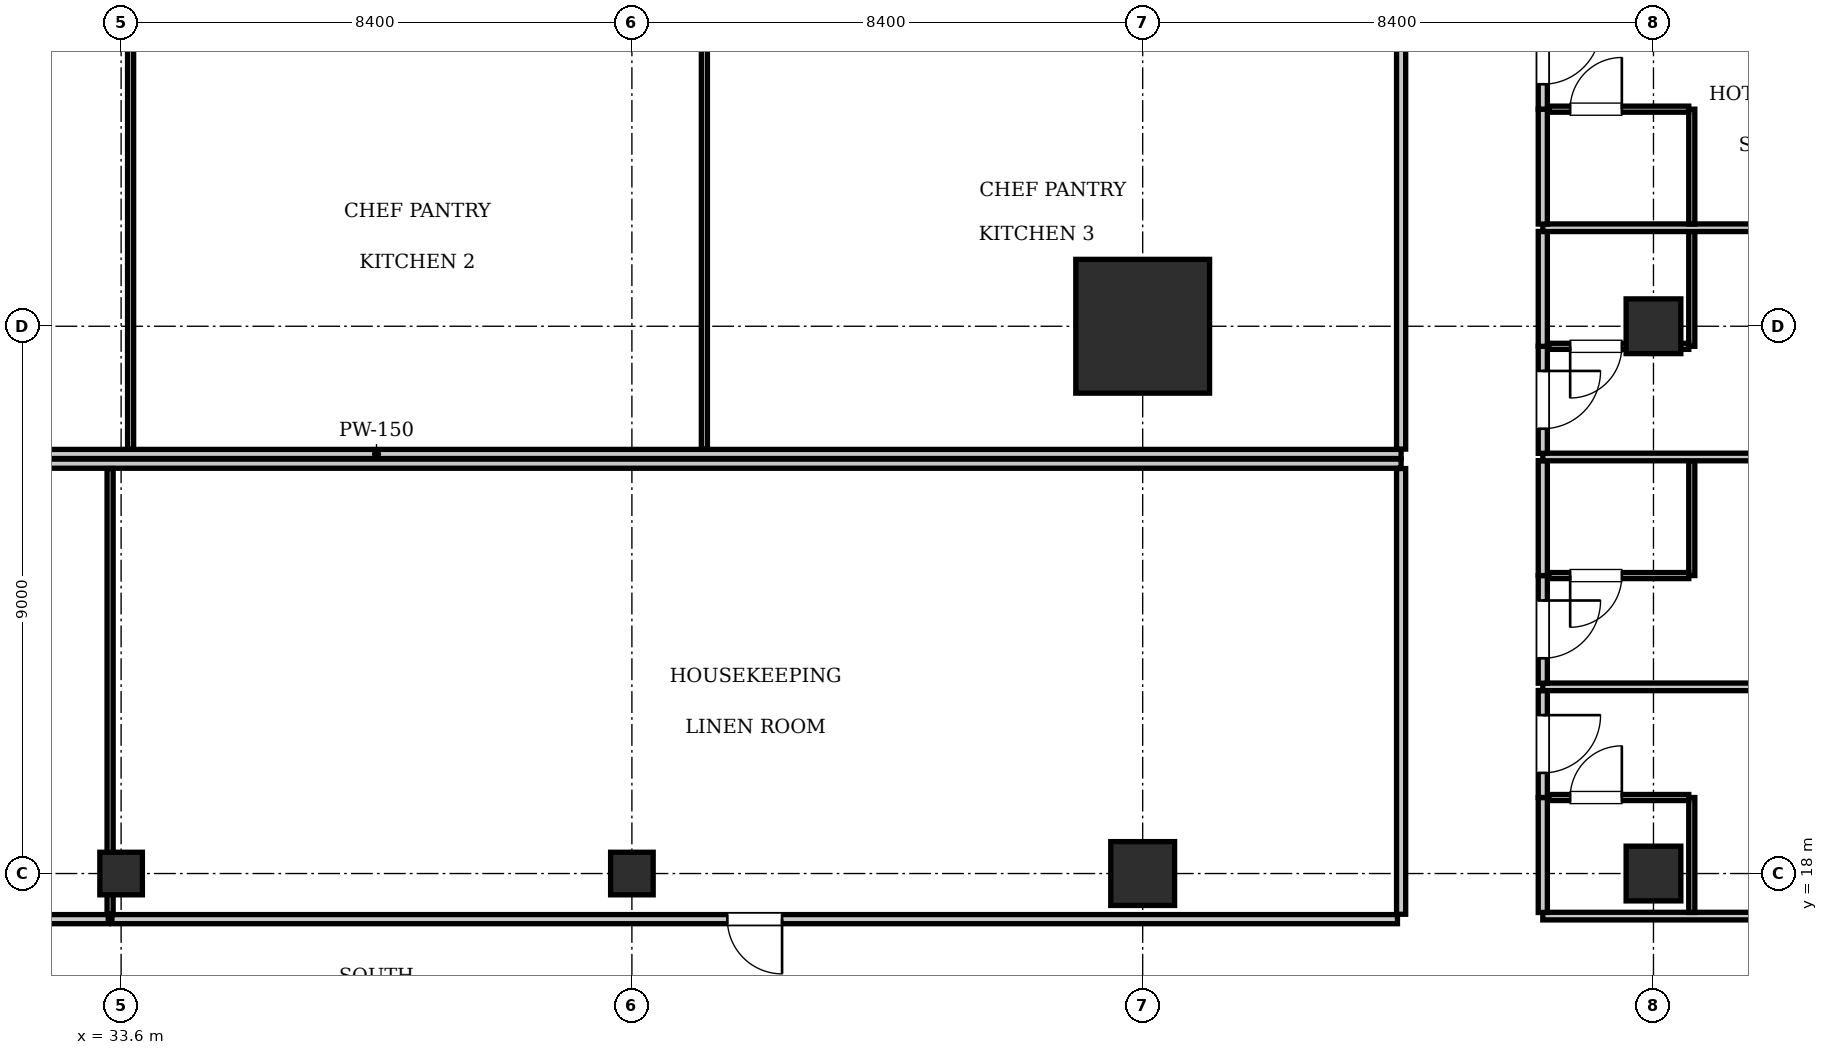
"""IFC4 building model, lengths in metres.
Left out: names, types, materials, properties, quantities, classifications, styles, units other than length and angle.
Written with IfcOpenShell. Run it as: python <this file> out.ifc"""

import sys

from ifc_helpers import new_model, si_unit, direction, frame, frame_2d, origin, origin_2d, place, context, subcontext, project, spatial, rectangle, i_section, extrude, element, fill, save


model = new_model("IFC4")
c1 = context("Model", 3, precision=1e-05, world=origin(), true_north=direction((0.0, 1.0)))
c2 = subcontext(c1, "Body", "Model", "MODEL_VIEW")
j1 = project(units=[si_unit("LENGTHUNIT", "METRE"), si_unit("PLANEANGLEUNIT", "RADIAN")], contexts=[c1])
p1 = place(None, origin())
s1 = spatial("IfcSite", under=j1, at=p1, CompositionType="ELEMENT")
p2 = place(p1, origin())
s2 = spatial("IfcBuilding", under=s1, at=p2, CompositionType="ELEMENT")
p3 = place(p2, frame((0.0, 0.0, 100.1)))
s3 = spatial("IfcBuildingStorey", under=s2, at=p3, CompositionType="ELEMENT", Elevation=100.1)
p4 = place(p3, frame((50.4, 27.0, 0.0), z_axis=(0.0, 0.0, 1.0), x_axis=(1.0, 0.0, 0.0)))
e1 = element("IfcColumn", 1, at=p4, inside=s3, PredefinedType="COLUMN", context=c2, shape_type="SweptSolid", body=[
    extrude(rectangle(XDim=2.2, YDim=2.2, at=origin_2d()), origin(), (0.0, 0.0, 1.0), 3.85),
])
p5 = place(p3, frame((50.4, 18.0, 0.0), z_axis=(0.0, 0.0, 1.0), x_axis=(1.0, 0.0, 0.0)))
e2 = element("IfcColumn", 2, at=p5, inside=s3, PredefinedType="COLUMN", context=c2, shape_type="SweptSolid", body=[
    extrude(rectangle(XDim=1.05, YDim=1.05, at=origin_2d()), origin(), (0.0, 0.0, 1.0), 3.85),
])
for number, where, z_axis, x_axis in (
    (3, (33.6, 18.0, 0.0), (0.0, 0.0, 1.0), (1.0, 0.0, 0.0)),
    (4, (42.0, 18.0, 0.0), (0.0, 0.0, 1.0), (1.0, 0.0, 0.0)),
):
    element("IfcColumn", number, at=place(p3, frame(where, z_axis=z_axis, x_axis=x_axis)), inside=s3, PredefinedType="COLUMN", context=c2, shape_type="SweptSolid", body=[
        extrude(i_section(OverallWidth=0.7, OverallDepth=0.7, WebThickness=0.028, FlangeThickness=0.044, at=origin_2d()), origin(), (0.0, 0.0, 1.0), 3.85),
    ])
for number, where, z_axis, x_axis in (
    (5, (58.8, 18.0, 0.0), (0.0, 0.0, 1.0), (1.0, 0.0, 0.0)),
    (6, (58.8, 27.0, 0.0), (0.0, 0.0, 1.0), (1.0, 0.0, 0.0)),
):
    element("IfcColumn", number, at=place(p3, frame(where, z_axis=z_axis, x_axis=x_axis)), inside=s3, PredefinedType="COLUMN", context=c2, shape_type="SweptSolid", body=[
        extrude(rectangle(XDim=0.9, YDim=0.9, at=origin_2d()), origin(), (0.0, 0.0, 1.0), 3.85),
    ])
p6 = place(p3, frame((20.95, 24.9, 0.0), z_axis=(0.0, 0.0, 1.0), x_axis=(1.0, 0.0, 0.0)))
e7 = element("IfcWall", 7, at=p6, inside=s3, PredefinedType="PARTITIONING", context=c2, shape_type="SweptSolid", body=[
    extrude(rectangle(XDim=33.7, YDim=0.15, at=frame_2d((16.85, 0.0))), origin(), (0.0, 0.0, 1.0), 3.61),
])
p7 = place(p3, frame((54.65, 24.98, 0.0), z_axis=(0.0, 0.0, 1.0), x_axis=(0.0, 1.0, 0.0)))
e8 = element("IfcWall", 8, at=p7, inside=s3, PredefinedType="PARTITIONING", context=c2, shape_type="SweptSolid", body=[
    extrude(rectangle(XDim=7.34, YDim=0.15, at=frame_2d((3.67, 0.0))), origin(), (0.0, 0.0, 1.0), 3.293),
])
p8 = place(p3, frame((33.756, 24.98, 0.0), z_axis=(0.0, 0.0, 1.0), x_axis=(0.0, 1.0, 0.0)))
e9 = element("IfcWall", 9, at=p8, inside=s3, PredefinedType="PARTITIONING", context=c2, shape_type="SweptSolid", body=[
    extrude(rectangle(XDim=7.34, YDim=0.1, at=frame_2d((3.67, 0.0))), origin(), (0.0, 0.0, 1.0), 2.999),
])
p9 = place(p3, frame((43.192, 24.98, 0.0), z_axis=(0.0, 0.0, 1.0), x_axis=(0.0, 1.0, 0.0)))
e10 = element("IfcWall", 10, at=p9, inside=s3, PredefinedType="PARTITIONING", context=c2, shape_type="SweptSolid", body=[
    extrude(rectangle(XDim=7.34, YDim=0.1, at=frame_2d((3.67, 0.0))), origin(), (0.0, 0.0, 1.0), 3.61),
])
p10 = place(p3, frame((20.95, 24.74, 0.0), z_axis=(0.0, 0.0, 1.0), x_axis=(1.0, 0.0, 0.0)))
e11 = element("IfcWall", 11, at=p10, inside=s3, PredefinedType="PARTITIONING", context=c2, shape_type="SweptSolid", body=[
    extrude(rectangle(XDim=33.7, YDim=0.15, at=frame_2d((16.85, 0.0))), origin(), (0.0, 0.0, 1.0), 3.61),
])
p11 = place(p3, frame((54.65, 17.33, 0.0), z_axis=(0.0, 0.0, 1.0), x_axis=(0.0, 1.0, 0.0)))
e12 = element("IfcWall", 12, at=p11, inside=s3, PredefinedType="PARTITIONING", context=c2, shape_type="SweptSolid", body=[
    extrude(rectangle(XDim=7.33, YDim=0.15, at=frame_2d((3.665, 0.0))), origin(), (0.0, 0.0, 1.0), 3.255),
])
p12 = place(p3, frame((21.01, 17.25, 0.0), z_axis=(0.0, 0.0, 1.0), x_axis=(1.0, 0.0, 0.0)))
e13 = element("IfcWall", 13, at=p12, inside=s3, PredefinedType="PARTITIONING", context=c2, shape_type="SweptSolid", body=[
    extrude(rectangle(XDim=12.379, YDim=0.15, at=frame_2d((6.189, 0.0))), origin(), (0.0, 0.0, 1.0), 3.61),
])
p13 = place(p12, frame((5.74, 0.0, 0.0)))
e14 = element("IfcOpeningElement", 14, at=p13, cuts=e13, PredefinedType="OPENING", context=c2, shape_type="SweptSolid", body=[
    extrude(rectangle(XDim=0.9, YDim=2.1, at=frame_2d((0.45, 1.05))), frame((0.0, 0.085, 0.0), z_axis=(0.0, -1.0, 0.0), x_axis=(1.0, 0.0, 0.0)), (0.0, 0.0, 1.0), 0.17),
])
p14 = place(p3, frame((33.419, 17.33, 0.0), z_axis=(0.0, 0.0, 1.0), x_axis=(0.0, 1.0, 0.0)))
e15 = element("IfcWall", 15, at=p14, inside=s3, PredefinedType="PARTITIONING", context=c2, shape_type="SweptSolid", body=[
    extrude(rectangle(XDim=7.33, YDim=0.1, at=frame_2d((3.665, 0.0))), origin(), (0.0, 0.0, 1.0), 2.999),
])
p15 = place(p3, frame((33.449, 17.25, 0.0), z_axis=(0.0, 0.0, 1.0), x_axis=(1.0, 0.0, 0.0)))
e16 = element("IfcWall", 16, at=p15, inside=s3, PredefinedType="PARTITIONING", context=c2, shape_type="SweptSolid", body=[
    extrude(rectangle(XDim=21.141, YDim=0.15, at=frame_2d((10.571, 0.0))), origin(), (0.0, 0.0, 1.0), 3.61),
])
p16 = place(p15, frame((10.121, 0.0, 0.0)))
e17 = element("IfcOpeningElement", 17, at=p16, cuts=e16, PredefinedType="OPENING", context=c2, shape_type="SweptSolid", body=[
    extrude(rectangle(XDim=0.9, YDim=2.1, at=frame_2d((0.45, 1.05))), frame((0.0, 0.085, 0.0), z_axis=(0.0, -1.0, 0.0), x_axis=(1.0, 0.0, 0.0)), (0.0, 0.0, 1.0), 0.17),
])
p17 = place(p3, frame((56.98, 17.3, 0.0), z_axis=(0.0, 0.0, 1.0), x_axis=(1.0, 0.0, 0.0)))
e18 = element("IfcWall", 18, at=p17, inside=s3, PredefinedType="PARTITIONING", context=c2, shape_type="SweptSolid", body=[
    extrude(rectangle(XDim=7.72, YDim=0.125, at=frame_2d((3.86, 0.0))), origin(), (0.0, 0.0, 1.0), 3.61),
])
p18 = place(p3, frame((56.98, 17.36, 0.0), z_axis=(0.0, 0.0, 1.0), x_axis=(0.0, 1.0, 0.0)))
e19 = element("IfcWall", 19, at=p18, inside=s3, PredefinedType="PARTITIONING", context=c2, shape_type="SweptSolid", body=[
    extrude(rectangle(XDim=1.89, YDim=0.15, at=frame_2d((0.945, 0.0))), origin(), (0.0, 0.0, 1.0), 3.61),
])
p19 = place(p3, frame((56.98, 19.25, 0.0), z_axis=(0.0, 0.0, 1.0), x_axis=(0.0, 1.0, 0.0)))
e20 = element("IfcWall", 20, at=p19, inside=s3, PredefinedType="PARTITIONING", context=c2, shape_type="SweptSolid", body=[
    extrude(rectangle(XDim=1.76, YDim=0.15, at=frame_2d((0.88, 0.0))), origin(), (0.0, 0.0, 1.0), 3.61),
])
p20 = place(p19, frame((0.405, 0.0, 0.0)))
e21 = element("IfcOpeningElement", 21, at=p20, cuts=e20, PredefinedType="OPENING", context=c2, shape_type="SweptSolid", body=[
    extrude(rectangle(XDim=0.95, YDim=2.15, at=frame_2d((0.475, 1.075))), frame((0.0, 0.085, 0.0), z_axis=(0.0, -1.0, 0.0), x_axis=(1.0, 0.0, 0.0)), (0.0, 0.0, 1.0), 0.17),
])
p21 = place(p3, frame((59.43, 17.36, 0.0), z_axis=(0.0, 0.0, 1.0), x_axis=(0.0, 1.0, 0.0)))
e22 = element("IfcWall", 22, at=p21, inside=s3, PredefinedType="PARTITIONING", context=c2, shape_type="SweptSolid", body=[
    extrude(rectangle(XDim=1.89, YDim=0.1, at=frame_2d((0.945, 0.0))), origin(), (0.0, 0.0, 1.0), 3.61),
])
p22 = place(p3, frame((57.08, 19.25, 0.0), z_axis=(0.0, 0.0, 1.0), x_axis=(1.0, 0.0, 0.0)))
e23 = element("IfcWall", 23, at=p22, inside=s3, PredefinedType="PARTITIONING", context=c2, shape_type="SweptSolid", body=[
    extrude(rectangle(XDim=2.3, YDim=0.1, at=frame_2d((1.15, 0.0))), origin(), (0.0, 0.0, 1.0), 3.61),
])
p23 = place(p22, frame((0.35, 0.0, 0.0)))
e24 = element("IfcOpeningElement", 24, at=p23, cuts=e23, PredefinedType="OPENING", context=c2, shape_type="SweptSolid", body=[
    extrude(rectangle(XDim=0.85, YDim=2.1, at=frame_2d((0.425, 1.05))), frame((0.0, 0.06, 0.0), z_axis=(0.0, -1.0, 0.0), x_axis=(1.0, 0.0, 0.0)), (0.0, 0.0, 1.0), 0.12),
])
p24 = place(p3, frame((56.98, 21.07, 0.0), z_axis=(0.0, 0.0, 1.0), x_axis=(1.0, 0.0, 0.0)))
e25 = element("IfcWall", 25, at=p24, inside=s3, PredefinedType="PARTITIONING", context=c2, shape_type="SweptSolid", body=[
    extrude(rectangle(XDim=7.72, YDim=0.125, at=frame_2d((3.86, 0.0))), origin(), (0.0, 0.0, 1.0), 3.61),
])
p25 = place(p3, frame((56.98, 21.13, 0.0), z_axis=(0.0, 0.0, 1.0), x_axis=(0.0, 1.0, 0.0)))
e26 = element("IfcWall", 26, at=p25, inside=s3, PredefinedType="PARTITIONING", context=c2, shape_type="SweptSolid", body=[
    extrude(rectangle(XDim=1.77, YDim=0.15, at=frame_2d((0.885, 0.0))), origin(), (0.0, 0.0, 1.0), 3.61),
])
p26 = place(p25, frame((0.41, 0.0, 0.0)))
e27 = element("IfcOpeningElement", 27, at=p26, cuts=e26, PredefinedType="OPENING", context=c2, shape_type="SweptSolid", body=[
    extrude(rectangle(XDim=0.95, YDim=2.15, at=frame_2d((0.475, 1.075))), frame((0.0, 0.085, 0.0), z_axis=(0.0, -1.0, 0.0), x_axis=(1.0, 0.0, 0.0)), (0.0, 0.0, 1.0), 0.17),
])
p27 = place(p3, frame((56.98, 22.9, 0.0), z_axis=(0.0, 0.0, 1.0), x_axis=(0.0, 1.0, 0.0)))
e28 = element("IfcWall", 28, at=p27, inside=s3, PredefinedType="PARTITIONING", context=c2, shape_type="SweptSolid", body=[
    extrude(rectangle(XDim=1.89, YDim=0.15, at=frame_2d((0.945, 0.0))), origin(), (0.0, 0.0, 1.0), 3.61),
])
p28 = place(p3, frame((59.43, 22.9, 0.0), z_axis=(0.0, 0.0, 1.0), x_axis=(0.0, 1.0, 0.0)))
e29 = element("IfcWall", 29, at=p28, inside=s3, PredefinedType="PARTITIONING", context=c2, shape_type="SweptSolid", body=[
    extrude(rectangle(XDim=1.89, YDim=0.1, at=frame_2d((0.945, 0.0))), origin(), (0.0, 0.0, 1.0), 3.61),
])
p29 = place(p3, frame((57.08, 22.9, 0.0), z_axis=(0.0, 0.0, 1.0), x_axis=(1.0, 0.0, 0.0)))
e30 = element("IfcWall", 30, at=p29, inside=s3, PredefinedType="PARTITIONING", context=c2, shape_type="SweptSolid", body=[
    extrude(rectangle(XDim=2.3, YDim=0.1, at=frame_2d((1.15, 0.0))), origin(), (0.0, 0.0, 1.0), 3.61),
])
p30 = place(p29, frame((0.35, 0.0, 0.0)))
e31 = element("IfcOpeningElement", 31, at=p30, cuts=e30, PredefinedType="OPENING", context=c2, shape_type="SweptSolid", body=[
    extrude(rectangle(XDim=0.85, YDim=2.1, at=frame_2d((0.425, 1.05))), frame((0.0, 0.06, 0.0), z_axis=(0.0, -1.0, 0.0), x_axis=(1.0, 0.0, 0.0)), (0.0, 0.0, 1.0), 0.12),
])
p31 = place(p3, frame((56.98, 24.85, 0.0), z_axis=(0.0, 0.0, 1.0), x_axis=(1.0, 0.0, 0.0)))
e32 = element("IfcWall", 32, at=p31, inside=s3, PredefinedType="PARTITIONING", context=c2, shape_type="SweptSolid", body=[
    extrude(rectangle(XDim=7.72, YDim=0.125, at=frame_2d((3.86, 0.0))), origin(), (0.0, 0.0, 1.0), 3.61),
])
p32 = place(p3, frame((56.98, 24.91, 0.0), z_axis=(0.0, 0.0, 1.0), x_axis=(0.0, 1.0, 0.0)))
e33 = element("IfcWall", 33, at=p32, inside=s3, PredefinedType="PARTITIONING", context=c2, shape_type="SweptSolid", body=[
    extrude(rectangle(XDim=1.76, YDim=0.15, at=frame_2d((0.88, 0.0))), origin(), (0.0, 0.0, 1.0), 3.61),
])
p33 = place(p32, frame((0.405, 0.0, 0.0)))
e34 = element("IfcOpeningElement", 34, at=p33, cuts=e33, PredefinedType="OPENING", context=c2, shape_type="SweptSolid", body=[
    extrude(rectangle(XDim=0.95, YDim=2.15, at=frame_2d((0.475, 1.075))), frame((0.0, 0.085, 0.0), z_axis=(0.0, -1.0, 0.0), x_axis=(1.0, 0.0, 0.0)), (0.0, 0.0, 1.0), 0.17),
])
p34 = place(p3, frame((56.98, 26.67, 0.0), z_axis=(0.0, 0.0, 1.0), x_axis=(0.0, 1.0, 0.0)))
e35 = element("IfcWall", 35, at=p34, inside=s3, PredefinedType="PARTITIONING", context=c2, shape_type="SweptSolid", body=[
    extrude(rectangle(XDim=1.89, YDim=0.15, at=frame_2d((0.945, 0.0))), origin(), (0.0, 0.0, 1.0), 3.61),
])
p35 = place(p3, frame((59.43, 26.67, 0.0), z_axis=(0.0, 0.0, 1.0), x_axis=(0.0, 1.0, 0.0)))
e36 = element("IfcWall", 36, at=p35, inside=s3, PredefinedType="PARTITIONING", context=c2, shape_type="SweptSolid", body=[
    extrude(rectangle(XDim=1.89, YDim=0.1, at=frame_2d((0.945, 0.0))), origin(), (0.0, 0.0, 1.0), 3.61),
])
p36 = place(p3, frame((57.08, 26.67, 0.0), z_axis=(0.0, 0.0, 1.0), x_axis=(1.0, 0.0, 0.0)))
e37 = element("IfcWall", 37, at=p36, inside=s3, PredefinedType="PARTITIONING", context=c2, shape_type="SweptSolid", body=[
    extrude(rectangle(XDim=2.3, YDim=0.1, at=frame_2d((1.15, 0.0))), origin(), (0.0, 0.0, 1.0), 3.61),
])
p37 = place(p36, frame((0.35, 0.0, 0.0)))
e38 = element("IfcOpeningElement", 38, at=p37, cuts=e37, PredefinedType="OPENING", context=c2, shape_type="SweptSolid", body=[
    extrude(rectangle(XDim=0.85, YDim=2.1, at=frame_2d((0.425, 1.05))), frame((0.0, 0.06, 0.0), z_axis=(0.0, -1.0, 0.0), x_axis=(1.0, 0.0, 0.0)), (0.0, 0.0, 1.0), 0.12),
])
p38 = place(p3, frame((56.98, 28.62, 0.0), z_axis=(0.0, 0.0, 1.0), x_axis=(1.0, 0.0, 0.0)))
e39 = element("IfcWall", 39, at=p38, inside=s3, PredefinedType="PARTITIONING", context=c2, shape_type="SweptSolid", body=[
    extrude(rectangle(XDim=7.72, YDim=0.125, at=frame_2d((3.86, 0.0))), origin(), (0.0, 0.0, 1.0), 3.61),
])
p39 = place(p3, frame((56.98, 28.68, 0.0), z_axis=(0.0, 0.0, 1.0), x_axis=(0.0, 1.0, 0.0)))
e40 = element("IfcWall", 40, at=p39, inside=s3, PredefinedType="PARTITIONING", context=c2, shape_type="SweptSolid", body=[
    extrude(rectangle(XDim=1.89, YDim=0.15, at=frame_2d((0.945, 0.0))), origin(), (0.0, 0.0, 1.0), 3.61),
])
p40 = place(p3, frame((56.98, 30.57, 0.0), z_axis=(0.0, 0.0, 1.0), x_axis=(0.0, 1.0, 0.0)))
e41 = element("IfcWall", 41, at=p40, inside=s3, PredefinedType="PARTITIONING", context=c2, shape_type="SweptSolid", body=[
    extrude(rectangle(XDim=1.77, YDim=0.15, at=frame_2d((0.885, 0.0))), origin(), (0.0, 0.0, 1.0), 3.61),
])
p41 = place(p40, frame((0.41, 0.0, 0.0)))
e42 = element("IfcOpeningElement", 42, at=p41, cuts=e41, PredefinedType="OPENING", context=c2, shape_type="SweptSolid", body=[
    extrude(rectangle(XDim=0.95, YDim=2.15, at=frame_2d((0.475, 1.075))), frame((0.0, 0.085, 0.0), z_axis=(0.0, -1.0, 0.0), x_axis=(1.0, 0.0, 0.0)), (0.0, 0.0, 1.0), 0.17),
])
p42 = place(p3, frame((59.43, 28.68, 0.0), z_axis=(0.0, 0.0, 1.0), x_axis=(0.0, 1.0, 0.0)))
e43 = element("IfcWall", 43, at=p42, inside=s3, PredefinedType="PARTITIONING", context=c2, shape_type="SweptSolid", body=[
    extrude(rectangle(XDim=1.89, YDim=0.1, at=frame_2d((0.945, 0.0))), origin(), (0.0, 0.0, 1.0), 3.61),
])
p43 = place(p3, frame((57.08, 30.57, 0.0), z_axis=(0.0, 0.0, 1.0), x_axis=(1.0, 0.0, 0.0)))
e44 = element("IfcWall", 44, at=p43, inside=s3, PredefinedType="PARTITIONING", context=c2, shape_type="SweptSolid", body=[
    extrude(rectangle(XDim=2.3, YDim=0.1, at=frame_2d((1.15, 0.0))), origin(), (0.0, 0.0, 1.0), 3.61),
])
p44 = place(p43, frame((0.35, 0.0, 0.0)))
e45 = element("IfcOpeningElement", 45, at=p44, cuts=e44, PredefinedType="OPENING", context=c2, shape_type="SweptSolid", body=[
    extrude(rectangle(XDim=0.85, YDim=2.1, at=frame_2d((0.425, 1.05))), frame((0.0, 0.06, 0.0), z_axis=(0.0, -1.0, 0.0), x_axis=(1.0, 0.0, 0.0)), (0.0, 0.0, 1.0), 0.12),
])
p45 = place(p16, frame((0.9, 0.0, 0.0), z_axis=(0.0, 0.0, 1.0), x_axis=(-1.0, 0.0, 0.0)))
e46 = element("IfcDoor", 46, at=p45, inside=s3, OperationType="SINGLE_SWING_LEFT", PredefinedType="DOOR", context=c2, shape_type="SweptSolid", body=[
    extrude(rectangle(XDim=0.9, YDim=2.1, at=frame_2d((0.45, 1.05))), frame((0.0, 0.025, 0.0), z_axis=(0.0, -1.0, 0.0), x_axis=(1.0, 0.0, 0.0)), (0.0, 0.0, 1.0), 0.05),
])
fill(e17, e46)
p46 = place(p23, origin())
e47 = element("IfcDoor", 47, at=p46, inside=s3, OperationType="SINGLE_SWING_RIGHT", PredefinedType="DOOR", context=c2, shape_type="SweptSolid", body=[
    extrude(rectangle(XDim=0.85, YDim=2.1, at=frame_2d((0.425, 1.05))), frame((0.0, 0.025, 0.0), z_axis=(0.0, -1.0, 0.0), x_axis=(1.0, 0.0, 0.0)), (0.0, 0.0, 1.0), 0.05),
])
fill(e24, e47)
p47 = place(p20, frame((0.95, 0.0, 0.0), z_axis=(0.0, 0.0, 1.0), x_axis=(-1.0, 0.0, 0.0)))
e48 = element("IfcDoor", 48, at=p47, inside=s3, OperationType="SINGLE_SWING_LEFT", PredefinedType="DOOR", context=c2, shape_type="SweptSolid", body=[
    extrude(rectangle(XDim=0.95, YDim=2.15, at=frame_2d((0.475, 1.075))), frame((0.0, 0.025, 0.0), z_axis=(0.0, -1.0, 0.0), x_axis=(1.0, 0.0, 0.0)), (0.0, 0.0, 1.0), 0.05),
])
fill(e21, e48)
p48 = place(p30, frame((0.85, 0.0, 0.0), z_axis=(0.0, 0.0, 1.0), x_axis=(-1.0, 0.0, 0.0)))
e49 = element("IfcDoor", 49, at=p48, inside=s3, OperationType="SINGLE_SWING_RIGHT", PredefinedType="DOOR", context=c2, shape_type="SweptSolid", body=[
    extrude(rectangle(XDim=0.85, YDim=2.1, at=frame_2d((0.425, 1.05))), frame((0.0, 0.025, 0.0), z_axis=(0.0, -1.0, 0.0), x_axis=(1.0, 0.0, 0.0)), (0.0, 0.0, 1.0), 0.05),
])
fill(e31, e49)
p49 = place(p26, frame((0.95, 0.0, 0.0), z_axis=(0.0, 0.0, 1.0), x_axis=(-1.0, 0.0, 0.0)))
e50 = element("IfcDoor", 50, at=p49, inside=s3, OperationType="SINGLE_SWING_LEFT", PredefinedType="DOOR", context=c2, shape_type="SweptSolid", body=[
    extrude(rectangle(XDim=0.95, YDim=2.15, at=frame_2d((0.475, 1.075))), frame((0.0, 0.025, 0.0), z_axis=(0.0, -1.0, 0.0), x_axis=(1.0, 0.0, 0.0)), (0.0, 0.0, 1.0), 0.05),
])
fill(e27, e50)
p50 = place(p37, frame((0.85, 0.0, 0.0), z_axis=(0.0, 0.0, 1.0), x_axis=(-1.0, 0.0, 0.0)))
e51 = element("IfcDoor", 51, at=p50, inside=s3, OperationType="SINGLE_SWING_RIGHT", PredefinedType="DOOR", context=c2, shape_type="SweptSolid", body=[
    extrude(rectangle(XDim=0.85, YDim=2.1, at=frame_2d((0.425, 1.05))), frame((0.0, 0.025, 0.0), z_axis=(0.0, -1.0, 0.0), x_axis=(1.0, 0.0, 0.0)), (0.0, 0.0, 1.0), 0.05),
])
fill(e38, e51)
p51 = place(p33, frame((0.95, 0.0, 0.0), z_axis=(0.0, 0.0, 1.0), x_axis=(-1.0, 0.0, 0.0)))
e52 = element("IfcDoor", 52, at=p51, inside=s3, OperationType="SINGLE_SWING_LEFT", PredefinedType="DOOR", context=c2, shape_type="SweptSolid", body=[
    extrude(rectangle(XDim=0.95, YDim=2.15, at=frame_2d((0.475, 1.075))), frame((0.0, 0.025, 0.0), z_axis=(0.0, -1.0, 0.0), x_axis=(1.0, 0.0, 0.0)), (0.0, 0.0, 1.0), 0.05),
])
fill(e34, e52)
p52 = place(p44, origin())
e53 = element("IfcDoor", 53, at=p52, inside=s3, OperationType="SINGLE_SWING_RIGHT", PredefinedType="DOOR", context=c2, shape_type="SweptSolid", body=[
    extrude(rectangle(XDim=0.85, YDim=2.1, at=frame_2d((0.425, 1.05))), frame((0.0, 0.025, 0.0), z_axis=(0.0, -1.0, 0.0), x_axis=(1.0, 0.0, 0.0)), (0.0, 0.0, 1.0), 0.05),
])
fill(e45, e53)
p53 = place(p41, frame((0.95, 0.0, 0.0), z_axis=(0.0, 0.0, 1.0), x_axis=(-1.0, 0.0, 0.0)))
e54 = element("IfcDoor", 54, at=p53, inside=s3, OperationType="SINGLE_SWING_LEFT", PredefinedType="DOOR", context=c2, shape_type="SweptSolid", body=[
    extrude(rectangle(XDim=0.95, YDim=2.15, at=frame_2d((0.475, 1.075))), frame((0.0, 0.025, 0.0), z_axis=(0.0, -1.0, 0.0), x_axis=(1.0, 0.0, 0.0)), (0.0, 0.0, 1.0), 0.05),
])
fill(e42, e54)
save(model, sys.argv[1])
